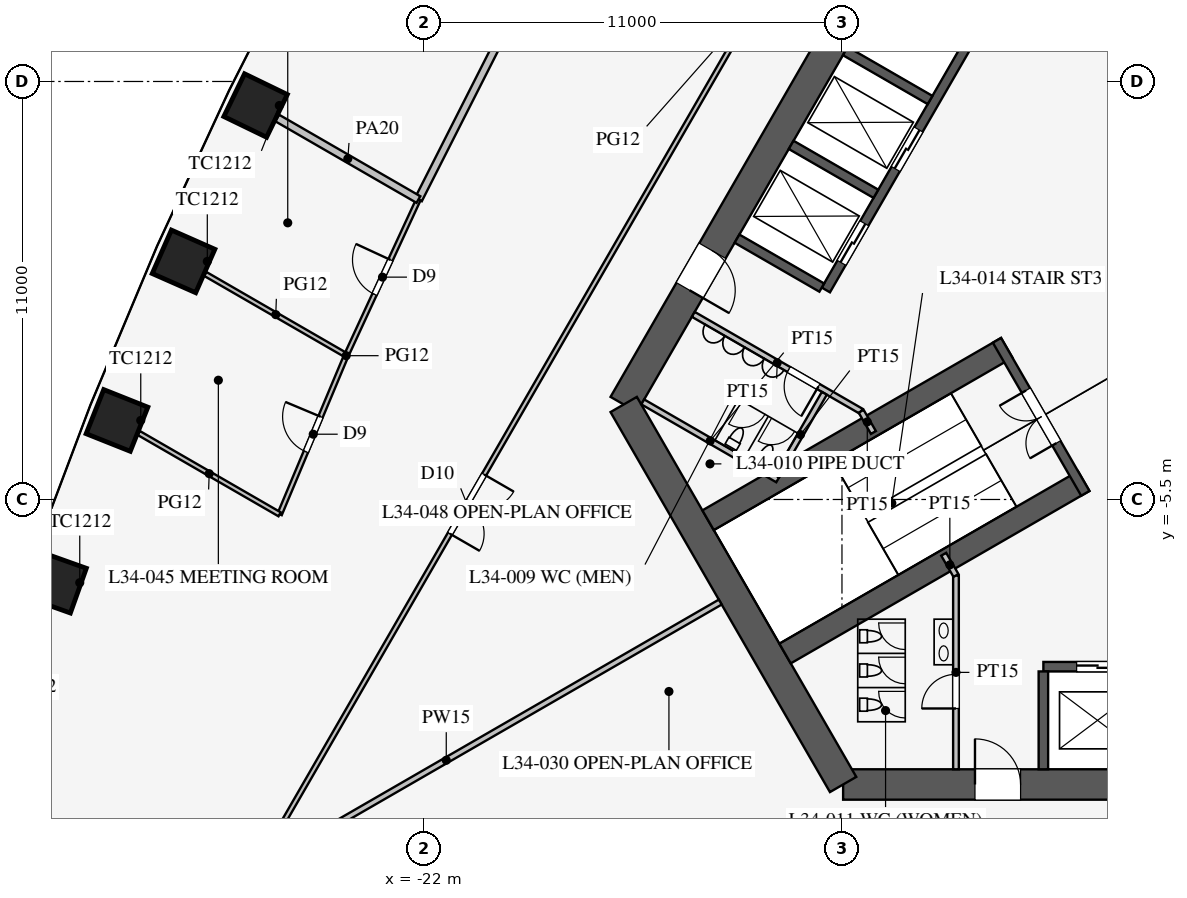
"""IFC4 building model, lengths in metres.
Left out: names, types, materials, properties, quantities, classifications, styles, units other than length and angle.
Written with IfcOpenShell. Run it as: python <this file> out.ifc"""

import sys

from ifc_helpers import new_model, si_unit, direction, frame, frame_2d, origin, origin_2d, place, context, subcontext, project, spatial, rectangle, extrude, element, fill, save


model = new_model("IFC4")
c1 = context("Model", 3, precision=1e-05, world=origin(), true_north=direction((0.0, 1.0)))
c2 = subcontext(c1, "Body", "Model", "MODEL_VIEW")
j1 = project(units=[si_unit("LENGTHUNIT", "METRE"), si_unit("PLANEANGLEUNIT", "RADIAN")], contexts=[c1])
p1 = place(None, origin())
s1 = spatial("IfcSite", under=j1, at=p1, CompositionType="ELEMENT")
p2 = place(p1, origin())
s2 = spatial("IfcBuilding", under=s1, at=p2, CompositionType="ELEMENT")
p3 = place(p2, frame((0.0, 0.0, 149.3)))
s3 = spatial("IfcBuildingStorey", under=s2, at=p3, CompositionType="ELEMENT", Elevation=149.3)
for number, where, z_axis, x_axis in (
    (1, (-26.43, 4.867, 0.0), (0.0, 0.0, 1.0), (-0.436, -0.9, 0.0)),
    (2, (-28.325, 0.765, 0.0), (0.0, 0.0, 1.0), (-0.403, -0.915, 0.0)),
    (3, (-30.077, -3.42, 0.0), (0.0, 0.0, 1.0), (-0.37, -0.929, 0.0)),
    (4, (-31.682, -7.689, 0.0), (0.0, 0.0, 1.0), (-0.336, -0.942, 0.0)),
):
    element("IfcColumn", number, at=place(p3, frame(where, z_axis=z_axis, x_axis=x_axis)), inside=s3, PredefinedType="COLUMN", context=c2, shape_type="SweptSolid", body=[
        extrude(rectangle(XDim=1.25, YDim=1.25, at=origin_2d()), origin(), (0.0, 0.0, 1.0), 4.2),
    ])
p4 = place(p3, frame((-10.97, -13.0, 0.0), z_axis=(0.0, 0.0, 1.0), x_axis=(1.0, 0.0, 0.0)))
e5 = element("IfcWall", 5, at=p4, inside=s3, PredefinedType="SHEAR", context=c2, shape_type="SweptSolid", body=[
    extrude(rectangle(XDim=21.939, YDim=0.8, at=frame_2d((10.97, 0.0))), origin(), (0.0, 0.0, 1.0), 4.2),
])
p5 = place(p4, frame((17.27, 0.0, 0.0)))
e6 = element("IfcOpeningElement", 6, at=p5, cuts=e5, PredefinedType="OPENING", context=c2, shape_type="SweptSolid", body=[
    extrude(rectangle(XDim=1.2, YDim=2.1, at=frame_2d((0.6, 1.05))), frame((0.0, 0.41, 0.0), z_axis=(0.0, -1.0, 0.0), x_axis=(1.0, 0.0, 0.0)), (0.0, 0.0, 1.0), 0.82),
])
p6 = place(p4, frame((3.47, 0.0, 0.0)))
e7 = element("IfcOpeningElement", 7, at=p6, cuts=e5, PredefinedType="OPENING", context=c2, shape_type="SweptSolid", body=[
    extrude(rectangle(XDim=1.2, YDim=2.1, at=frame_2d((0.6, 1.05))), frame((0.0, 0.41, 0.0), z_axis=(0.0, -1.0, 0.0), x_axis=(1.0, 0.0, 0.0)), (0.0, 0.0, 1.0), 0.82),
])
p7 = place(p3, frame((-5.773, 16.0, 0.0), z_axis=(0.0, 0.0, 1.0), x_axis=(-0.500002442456, -0.866023993627, 0.0)))
e8 = element("IfcWall", 8, at=p7, inside=s3, PredefinedType="SHEAR", context=c2, shape_type="SweptSolid", body=[
    extrude(rectangle(XDim=21.939, YDim=0.8, at=frame_2d((10.97, 0.0))), origin(), (0.0, 0.0, 1.0), 4.2),
])
p8 = place(p7, frame((17.27, 0.0, 0.0)))
e9 = element("IfcOpeningElement", 9, at=p8, cuts=e8, PredefinedType="OPENING", context=c2, shape_type="SweptSolid", body=[
    extrude(rectangle(XDim=1.2, YDim=2.1, at=frame_2d((0.6, 1.05))), frame((0.0, 0.41, 0.0), z_axis=(0.0, -1.0, 0.0), x_axis=(1.0, 0.0, 0.0)), (0.0, 0.0, 1.0), 0.82),
])
p9 = place(p7, frame((3.47, 0.0, 0.0)))
e10 = element("IfcOpeningElement", 10, at=p9, cuts=e8, PredefinedType="OPENING", context=c2, shape_type="SweptSolid", body=[
    extrude(rectangle(XDim=1.2, YDim=2.1, at=frame_2d((0.6, 1.05))), frame((0.0, 0.41, 0.0), z_axis=(0.0, -1.0, 0.0), x_axis=(1.0, 0.0, 0.0)), (0.0, 0.0, 1.0), 0.82),
])
p10 = place(p3, frame((-16.743, -3.0, 0.0), z_axis=(0.0, 0.0, 1.0), x_axis=(0.499995765644, -0.866027848477, 0.0)))
e11 = element("IfcWall", 11, at=p10, inside=s3, PredefinedType="SHEAR", context=c2, shape_type="SweptSolid", body=[
    extrude(rectangle(XDim=11.547, YDim=0.8, at=frame_2d((5.773, 0.0))), origin(), (0.0, 0.0, 1.0), 4.2),
])
p11 = place(p3, frame((-5.7, -9.9, 0.0), z_axis=(0.0, 0.0, 1.0), x_axis=(1.0, 0.0, 0.0)))
e12 = element("IfcWall", 12, at=p11, inside=s3, PredefinedType="SHEAR", context=c2, shape_type="SweptSolid", body=[
    extrude(rectangle(XDim=11.4, YDim=0.25, at=frame_2d((5.7, 0.0))), origin(), (0.0, 0.0, 1.0), 4.2),
])
p12 = place(p11, frame((0.875, 0.0, 0.0)))
e13 = element("IfcOpeningElement", 13, at=p12, cuts=e12, PredefinedType="OPENING", context=c2, shape_type="SweptSolid", body=[
    extrude(rectangle(XDim=1.1, YDim=2.2, at=frame_2d((0.55, 1.1))), frame((0.0, 0.135, 0.0), z_axis=(0.0, -1.0, 0.0), x_axis=(1.0, 0.0, 0.0)), (0.0, 0.0, 1.0), 0.27),
])
p13 = place(p11, frame((3.725, 0.0, 0.0)))
e14 = element("IfcOpeningElement", 14, at=p13, cuts=e12, PredefinedType="OPENING", context=c2, shape_type="SweptSolid", body=[
    extrude(rectangle(XDim=1.1, YDim=2.2, at=frame_2d((0.55, 1.1))), frame((0.0, 0.135, 0.0), z_axis=(0.0, -1.0, 0.0), x_axis=(1.0, 0.0, 0.0)), (0.0, 0.0, 1.0), 0.27),
])
p14 = place(p11, frame((6.575, 0.0, 0.0)))
e15 = element("IfcOpeningElement", 15, at=p14, cuts=e12, PredefinedType="OPENING", context=c2, shape_type="SweptSolid", body=[
    extrude(rectangle(XDim=1.1, YDim=2.2, at=frame_2d((0.55, 1.1))), frame((0.0, 0.135, 0.0), z_axis=(0.0, -1.0, 0.0), x_axis=(1.0, 0.0, 0.0)), (0.0, 0.0, 1.0), 0.27),
])
p15 = place(p11, frame((9.425, 0.0, 0.0)))
e16 = element("IfcOpeningElement", 16, at=p15, cuts=e12, PredefinedType="OPENING", context=c2, shape_type="SweptSolid", body=[
    extrude(rectangle(XDim=1.1, YDim=2.2, at=frame_2d((0.55, 1.1))), frame((0.0, 0.135, 0.0), z_axis=(0.0, -1.0, 0.0), x_axis=(1.0, 0.0, 0.0)), (0.0, 0.0, 1.0), 0.27),
])
p16 = place(p3, frame((-5.7, -10.025, 0.0), z_axis=(0.0, 0.0, 1.0), x_axis=(0.0, -1.0, 0.0)))
e17 = element("IfcWall", 17, at=p16, inside=s3, PredefinedType="SHEAR", context=c2, shape_type="SweptSolid", body=[
    extrude(rectangle(XDim=2.575, YDim=0.25, at=frame_2d((1.288, 0.0))), origin(), (0.0, 0.0, 1.0), 4.2),
])
p17 = place(p3, frame((-5.724, 9.886, 0.0), z_axis=(0.0, 0.0, 1.0), x_axis=(-0.500001763848, -0.866024385424, 0.0)))
e18 = element("IfcWall", 18, at=p17, inside=s3, PredefinedType="SHEAR", context=c2, shape_type="SweptSolid", body=[
    extrude(rectangle(XDim=11.4, YDim=0.25, at=frame_2d((5.7, 0.0))), origin(), (0.0, 0.0, 1.0), 4.2),
])
p18 = place(p17, frame((6.525, 0.0, 0.0)))
e19 = element("IfcOpeningElement", 19, at=p18, cuts=e18, PredefinedType="OPENING", context=c2, shape_type="SweptSolid", body=[
    extrude(rectangle(XDim=1.2, YDim=2.2, at=frame_2d((0.6, 1.1))), frame((0.0, 0.135, 0.0), z_axis=(0.0, -1.0, 0.0), x_axis=(1.0, 0.0, 0.0)), (0.0, 0.0, 1.0), 0.27),
])
p19 = place(p17, frame((9.375, 0.0, 0.0)))
e20 = element("IfcOpeningElement", 20, at=p19, cuts=e18, PredefinedType="OPENING", context=c2, shape_type="SweptSolid", body=[
    extrude(rectangle(XDim=1.2, YDim=2.2, at=frame_2d((0.6, 1.1))), frame((0.0, 0.135, 0.0), z_axis=(0.0, -1.0, 0.0), x_axis=(1.0, 0.0, 0.0)), (0.0, 0.0, 1.0), 0.27),
])
for number, where, z_axis, x_axis in (
    (21, (-8.682, 5.012, 0.0), (0.0, 0.0, 1.0), (-0.866, 0.5, 0.0)),
    (22, (-10.107, 2.544, 0.0), (0.0, 0.0, 1.0), (-0.866, 0.5, 0.0)),
    (23, (-11.532, 0.076, 0.0), (0.0, 0.0, 1.0), (-0.866, 0.5, 0.0)),
):
    element("IfcWall", number, at=place(p3, frame(where, z_axis=z_axis, x_axis=x_axis)), inside=s3, PredefinedType="SHEAR", context=c2, shape_type="SweptSolid", body=[
        extrude(rectangle(XDim=2.575, YDim=0.25, at=frame_2d((1.288, 0.0))), origin(), (0.0, 0.0, 1.0), 4.2),
    ])
for number, where, z_axis, x_axis in (
    (24, (-6.663, -1.509, 0.0), (0.0, 0.0, 1.0), (-0.866, -0.5, 0.0)),
    (25, (-4.638, -5.016, 0.0), (0.0, 0.0, 1.0), (-0.866, -0.5, 0.0)),
):
    element("IfcWall", number, at=place(p3, frame(where, z_axis=z_axis, x_axis=x_axis)), inside=s3, PredefinedType="SHEAR", context=c2, shape_type="SweptSolid", body=[
        extrude(rectangle(XDim=9.075, YDim=0.6, at=frame_2d((4.538, 0.0))), origin(), (0.0, 0.0, 1.0), 4.2),
    ])
p20 = place(p3, frame((-6.922, -1.312, 0.0), z_axis=(0.0, 0.0, 1.0), x_axis=(0.499984536904, -0.866034331223, 0.0)))
e26 = element("IfcWall", 26, at=p20, inside=s3, PredefinedType="SHEAR", context=c2, shape_type="SweptSolid", body=[
    extrude(rectangle(XDim=4.65, YDim=0.25, at=frame_2d((2.325, 0.0))), origin(), (0.0, 0.0, 1.0), 4.2),
])
p21 = place(p20, frame((1.525, 0.0, 0.0)))
e27 = element("IfcOpeningElement", 27, at=p21, cuts=e26, PredefinedType="OPENING", context=c2, shape_type="SweptSolid", body=[
    extrude(rectangle(XDim=1.6, YDim=2.1, at=frame_2d((0.8, 1.05))), frame((0.0, 0.135, 0.0), z_axis=(0.0, -1.0, 0.0), x_axis=(1.0, 0.0, 0.0)), (0.0, 0.0, 1.0), 0.27),
])
p22 = place(p3, frame((-8.0, -7.5, 0.0), z_axis=(0.0, 0.0, 1.0), x_axis=(0.0, -1.0, 0.0)))
e28 = element("IfcWall", 28, at=p22, inside=s3, PredefinedType="PARTITIONING", context=c2, shape_type="SweptSolid", body=[
    extrude(rectangle(XDim=5.1, YDim=0.15, at=frame_2d((2.55, 0.0))), origin(), (0.0, 0.0, 1.0), 4.0),
])
p23 = place(p22, frame((2.6, 0.0, 0.0)))
e29 = element("IfcOpeningElement", 29, at=p23, cuts=e28, PredefinedType="OPENING", context=c2, shape_type="SweptSolid", body=[
    extrude(rectangle(XDim=0.9, YDim=2.1, at=frame_2d((0.45, 1.05))), frame((0.0, 0.085, 0.0), z_axis=(0.0, -1.0, 0.0), x_axis=(1.0, 0.0, 0.0)), (0.0, 0.0, 1.0), 0.17),
])
p24 = place(p3, frame((-10.495, -3.178, 0.0), z_axis=(0.0, 0.0, 1.0), x_axis=(-0.86602216432, 0.500005610874, 0.0)))
e30 = element("IfcWall", 30, at=p24, inside=s3, PredefinedType="PARTITIONING", context=c2, shape_type="SweptSolid", body=[
    extrude(rectangle(XDim=5.1, YDim=0.15, at=frame_2d((2.55, 0.0))), origin(), (0.0, 0.0, 1.0), 4.0),
])
p25 = place(p24, frame((1.3, 0.0, 0.0)))
e31 = element("IfcOpeningElement", 31, at=p25, cuts=e30, PredefinedType="OPENING", context=c2, shape_type="SweptSolid", body=[
    extrude(rectangle(XDim=0.9, YDim=2.1, at=frame_2d((0.45, 1.05))), frame((0.0, 0.085, 0.0), z_axis=(0.0, -1.0, 0.0), x_axis=(1.0, 0.0, 0.0)), (0.0, 0.0, 1.0), 0.17),
])
for number, where, z_axis, x_axis in (
    (32, (-10.495, -3.178, 0.0), (0.0, 0.0, 1.0), (0.5, -0.866, 0.0)),
    (33, (-8.0, -7.5, 0.0), (0.0, 0.0, 1.0), (-0.5, 0.866, 0.0)),
):
    element("IfcWall", number, at=place(p3, frame(where, z_axis=z_axis, x_axis=x_axis)), inside=s3, PredefinedType="PARTITIONING", context=c2, shape_type="SweptSolid", body=[
        extrude(rectangle(XDim=0.645, YDim=0.15, at=frame_2d((0.323, 0.0))), origin(), (0.0, 0.0, 1.0), 4.0),
    ])
p26 = place(p3, frame((-12.691, -4.982, 0.0), z_axis=(0.0, 0.0, 1.0), x_axis=(-0.8660249478, 0.500000789788, 0.0)))
e34 = element("IfcWall", 34, at=p26, inside=s3, PredefinedType="PARTITIONING", context=c2, shape_type="SweptSolid", body=[
    extrude(rectangle(XDim=4.1, YDim=0.15, at=frame_2d((2.05, 0.0))), origin(), (0.0, 0.0, 1.0), 4.0),
])
p27 = place(p3, frame((-11.464, -2.706, 0.0), z_axis=(0.0, 0.0, 1.0), x_axis=(-0.50001992892, -0.866013897511, 0.0)))
e35 = element("IfcWall", 35, at=p27, inside=s3, PredefinedType="PARTITIONING", context=c2, shape_type="SweptSolid", body=[
    extrude(rectangle(XDim=2.51, YDim=0.15, at=frame_2d((1.255, 0.0))), origin(), (0.0, 0.0, 1.0), 4.0),
])
p28 = place(p3, frame((-14.203, -8.2, 0.0), z_axis=(0.0, 0.0, 1.0), x_axis=(-0.866024668836, -0.500001272966, 0.0)))
e36 = element("IfcWall", 36, at=p28, inside=s3, PredefinedType="PARTITIONING", context=c2, shape_type="SweptSolid", body=[
    extrude(rectangle(XDim=16.65, YDim=0.15, at=frame_2d((8.325, 0.0))), origin(), (0.0, 0.0, 1.0), 2.3),
])
p29 = place(p3, frame((-0.016, 30.491, 0.0), z_axis=(0.0, 0.0, 1.0), x_axis=(-0.50000091641, -0.866024874695, 0.0)))
e37 = element("IfcWall", 37, at=p29, inside=s3, PredefinedType="PARTITIONING", context=c2, shape_type="SweptSolid", body=[
    extrude(rectangle(XDim=52.796, YDim=0.12, at=frame_2d((26.398, 0.0))), origin(), (0.0, 0.0, 1.0), 2.9),
])
p30 = place(p29, frame((10.2, 0.0, 0.15)))
e38 = element("IfcOpeningElement", 38, at=p30, cuts=e37, PredefinedType="OPENING", context=c2, shape_type="SweptSolid", body=[
    extrude(rectangle(XDim=1.8, YDim=2.1, at=frame_2d((0.9, 1.05))), frame((0.0, 0.07, 0.0), z_axis=(0.0, -1.0, 0.0), x_axis=(1.0, 0.0, 0.0)), (0.0, 0.0, 1.0), 0.14),
])
p31 = place(p29, frame((40.8, 0.0, 0.15)))
e39 = element("IfcOpeningElement", 39, at=p31, cuts=e37, PredefinedType="OPENING", context=c2, shape_type="SweptSolid", body=[
    extrude(rectangle(XDim=1.8, YDim=2.1, at=frame_2d((0.9, 1.05))), frame((0.0, 0.07, 0.0), z_axis=(0.0, -1.0, 0.0), x_axis=(1.0, 0.0, 0.0)), (0.0, 0.0, 1.0), 0.14),
])
p32 = place(p3, frame((-24.043, -1.708, 0.0), z_axis=(0.0, 0.0, 1.0), x_axis=(-0.386762112496, -0.922179520667, 0.0)))
e40 = element("IfcWall", 40, at=p32, inside=s3, PredefinedType="PARTITIONING", context=c2, shape_type="SweptSolid", body=[
    extrude(rectangle(XDim=4.536, YDim=0.12, at=frame_2d((2.268, 0.0))), origin(), (0.0, 0.0, 1.0), 2.9),
])
p33 = place(p32, frame((1.75, 0.0, 0.15)))
e41 = element("IfcOpeningElement", 41, at=p33, cuts=e40, PredefinedType="OPENING", context=c2, shape_type="SweptSolid", body=[
    extrude(rectangle(XDim=1.0, YDim=2.1, at=frame_2d((0.5, 1.05))), frame((0.0, 0.07, 0.0), z_axis=(0.0, -1.0, 0.0), x_axis=(1.0, 0.0, 0.0)), (0.0, 0.0, 1.0), 0.14),
])
p34 = place(p3, frame((-20.106, 6.412, 0.0), z_axis=(0.0, 0.0, 1.0), x_axis=(-0.452471679136, -0.891778772779, 0.0)))
e42 = element("IfcWall", 42, at=p34, inside=s3, PredefinedType="PARTITIONING", context=c2, shape_type="SweptSolid", body=[
    extrude(rectangle(XDim=4.507, YDim=0.2, at=frame_2d((2.253, 0.0))), origin(), (0.0, 0.0, 1.0), 2.9),
])
p35 = place(p3, frame((-22.145, 2.393, 0.0), z_axis=(0.0, 0.0, 1.0), x_axis=(-0.41992827805, -0.90755729367, 0.0)))
e43 = element("IfcWall", 43, at=p35, inside=s3, PredefinedType="PARTITIONING", context=c2, shape_type="SweptSolid", body=[
    extrude(rectangle(XDim=4.519, YDim=0.12, at=frame_2d((2.259, 0.0))), origin(), (0.0, 0.0, 1.0), 2.9),
])
p36 = place(p35, frame((1.75, 0.0, 0.15)))
e44 = element("IfcOpeningElement", 44, at=p36, cuts=e43, PredefinedType="OPENING", context=c2, shape_type="SweptSolid", body=[
    extrude(rectangle(XDim=1.0, YDim=2.1, at=frame_2d((0.5, 1.05))), frame((0.0, 0.07, 0.0), z_axis=(0.0, -1.0, 0.0), x_axis=(1.0, 0.0, 0.0)), (0.0, 0.0, 1.0), 0.14),
])
p37 = place(p3, frame((-24.043, -1.708, 0.0), z_axis=(0.0, 0.0, 1.0), x_axis=(-0.866015805976, 0.500016623523, 0.0)))
e45 = element("IfcWall", 45, at=p37, inside=s3, PredefinedType="PARTITIONING", context=c2, shape_type="SweptSolid", body=[
    extrude(rectangle(XDim=4.286, YDim=0.12, at=frame_2d((2.143, 0.0))), origin(), (0.0, 0.0, 1.0), 2.9),
])
p38 = place(p3, frame((-25.797, -5.891, 0.0), z_axis=(0.0, 0.0, 1.0), x_axis=(-0.866019337872, 0.500010506321, 0.0)))
e46 = element("IfcWall", 46, at=p38, inside=s3, PredefinedType="PARTITIONING", context=c2, shape_type="SweptSolid", body=[
    extrude(rectangle(XDim=4.28, YDim=0.12, at=frame_2d((2.14, 0.0))), origin(), (0.0, 0.0, 1.0), 2.9),
])
p39 = place(p3, frame((-22.145, 2.393, 0.0), z_axis=(0.0, 0.0, 1.0), x_axis=(-0.866035893414, 0.499981830989, 0.0)))
e47 = element("IfcWall", 47, at=p39, inside=s3, PredefinedType="PARTITIONING", context=c2, shape_type="SweptSolid", body=[
    extrude(rectangle(XDim=4.291, YDim=0.2, at=frame_2d((2.146, 0.0))), origin(), (0.0, 0.0, 1.0), 2.9),
])
p40 = place(p23, frame((0.9, 0.0, 0.0), z_axis=(0.0, 0.0, 1.0), x_axis=(-1.0, 0.0, 0.0)))
e48 = element("IfcDoor", 48, at=p40, inside=s3, OperationType="SINGLE_SWING_LEFT", PredefinedType="DOOR", context=c2, shape_type="SweptSolid", body=[
    extrude(rectangle(XDim=0.9, YDim=2.1, at=frame_2d((0.45, 1.05))), frame((0.0, 0.025, 0.0), z_axis=(0.0, -1.0, 0.0), x_axis=(1.0, 0.0, 0.0)), (0.0, 0.0, 1.0), 0.05),
])
fill(e29, e48)
p41 = place(p25, origin())
e49 = element("IfcDoor", 49, at=p41, inside=s3, OperationType="SINGLE_SWING_LEFT", PredefinedType="DOOR", context=c2, shape_type="SweptSolid", body=[
    extrude(rectangle(XDim=0.9, YDim=2.1, at=frame_2d((0.45, 1.05))), frame((0.0, 0.025, 0.0), z_axis=(0.0, -1.0, 0.0), x_axis=(1.0, 0.0, 0.0)), (0.0, 0.0, 1.0), 0.05),
])
fill(e31, e49)
p42 = place(p21, frame((1.6, 0.0, 0.0), z_axis=(0.0, 0.0, 1.0), x_axis=(-1.0, 0.0, 0.0)))
e50 = element("IfcDoor", 50, at=p42, inside=s3, OperationType="DOUBLE_DOOR_SINGLE_SWING", PredefinedType="DOOR", context=c2, shape_type="SweptSolid", body=[
    extrude(rectangle(XDim=1.6, YDim=2.1, at=frame_2d((0.8, 1.05))), frame((0.0, 0.025, 0.0), z_axis=(0.0, -1.0, 0.0), x_axis=(1.0, 0.0, 0.0)), (0.0, 0.0, 1.0), 0.05),
])
fill(e27, e50)
p43 = place(p6, origin())
e51 = element("IfcDoor", 51, at=p43, inside=s3, OperationType="SINGLE_SWING_LEFT", PredefinedType="DOOR", context=c2, shape_type="SweptSolid", body=[
    extrude(rectangle(XDim=1.2, YDim=2.1, at=frame_2d((0.6, 1.05))), frame((0.0, 0.025, 0.0), z_axis=(0.0, -1.0, 0.0), x_axis=(1.0, 0.0, 0.0)), (0.0, 0.0, 1.0), 0.05),
])
fill(e7, e51)
p44 = place(p8, origin())
e52 = element("IfcDoor", 52, at=p44, inside=s3, OperationType="SINGLE_SWING_RIGHT", PredefinedType="DOOR", context=c2, shape_type="SweptSolid", body=[
    extrude(rectangle(XDim=1.2, YDim=2.1, at=frame_2d((0.6, 1.05))), frame((0.0, 0.025, 0.0), z_axis=(0.0, -1.0, 0.0), x_axis=(1.0, 0.0, 0.0)), (0.0, 0.0, 1.0), 0.05),
])
fill(e9, e52)
p45 = place(p36, frame((1.0, 0.0, 0.0), z_axis=(0.0, 0.0, 1.0), x_axis=(-1.0, 0.0, 0.0)))
e53 = element("IfcDoor", 53, at=p45, inside=s3, OperationType="SINGLE_SWING_RIGHT", PredefinedType="DOOR", context=c2, shape_type="SweptSolid", body=[
    extrude(rectangle(XDim=1.0, YDim=2.1, at=frame_2d((0.5, 1.05))), frame((0.0, 0.025, 0.0), z_axis=(0.0, -1.0, 0.0), x_axis=(1.0, 0.0, 0.0)), (0.0, 0.0, 1.0), 0.05),
])
fill(e44, e53)
p46 = place(p33, frame((1.0, 0.0, 0.0), z_axis=(0.0, 0.0, 1.0), x_axis=(-1.0, 0.0, 0.0)))
e54 = element("IfcDoor", 54, at=p46, inside=s3, OperationType="SINGLE_SWING_RIGHT", PredefinedType="DOOR", context=c2, shape_type="SweptSolid", body=[
    extrude(rectangle(XDim=1.0, YDim=2.1, at=frame_2d((0.5, 1.05))), frame((0.0, 0.025, 0.0), z_axis=(0.0, -1.0, 0.0), x_axis=(1.0, 0.0, 0.0)), (0.0, 0.0, 1.0), 0.05),
])
fill(e41, e54)
p47 = place(p31, origin())
e55 = element("IfcDoor", 55, at=p47, inside=s3, OperationType="DOUBLE_DOOR_SINGLE_SWING", PredefinedType="DOOR", context=c2, shape_type="SweptSolid", body=[
    extrude(rectangle(XDim=1.8, YDim=2.1, at=frame_2d((0.9, 1.05))), frame((0.0, 0.025, 0.0), z_axis=(0.0, -1.0, 0.0), x_axis=(1.0, 0.0, 0.0)), (0.0, 0.0, 1.0), 0.05),
])
fill(e39, e55)
p48 = place(p12, origin())
e56 = element("IfcDoor", 56, at=p48, inside=s3, OperationType="DOUBLE_DOOR_SLIDING", PredefinedType="DOOR", context=c2, shape_type="SweptSolid", body=[
    extrude(rectangle(XDim=1.1, YDim=2.2, at=frame_2d((0.55, 1.1))), frame((0.0, 0.025, 0.0), z_axis=(0.0, -1.0, 0.0), x_axis=(1.0, 0.0, 0.0)), (0.0, 0.0, 1.0), 0.05),
])
fill(e13, e56)
p49 = place(p18, origin())
e57 = element("IfcDoor", 57, at=p49, inside=s3, OperationType="DOUBLE_DOOR_SLIDING", PredefinedType="DOOR", context=c2, shape_type="SweptSolid", body=[
    extrude(rectangle(XDim=1.2, YDim=2.2, at=frame_2d((0.6, 1.1))), frame((0.0, 0.025, 0.0), z_axis=(0.0, -1.0, 0.0), x_axis=(1.0, 0.0, 0.0)), (0.0, 0.0, 1.0), 0.05),
])
fill(e19, e57)
p50 = place(p19, origin())
e58 = element("IfcDoor", 58, at=p50, inside=s3, OperationType="DOUBLE_DOOR_SLIDING", PredefinedType="DOOR", context=c2, shape_type="SweptSolid", body=[
    extrude(rectangle(XDim=1.2, YDim=2.2, at=frame_2d((0.6, 1.1))), frame((0.0, 0.025, 0.0), z_axis=(0.0, -1.0, 0.0), x_axis=(1.0, 0.0, 0.0)), (0.0, 0.0, 1.0), 0.05),
])
fill(e20, e58)
save(model, sys.argv[1])
